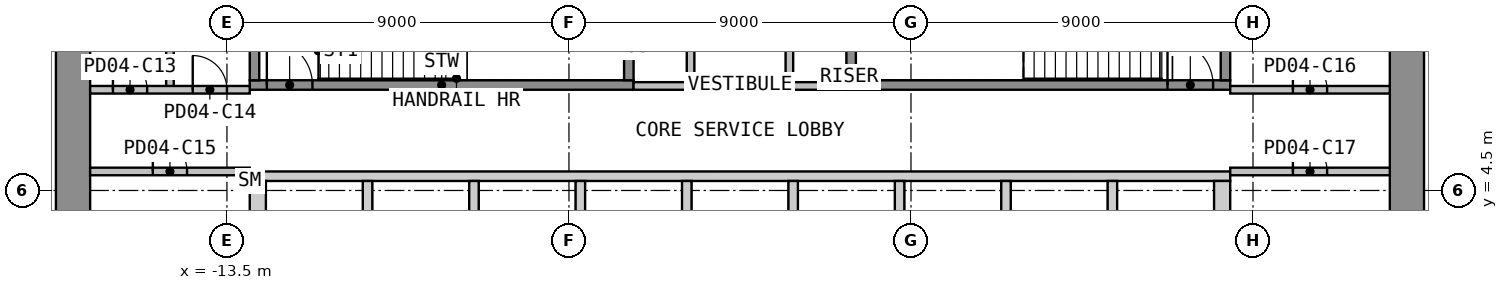
"""IFC4 building model, lengths in metres.
Left out: names, types, materials, properties, quantities, classifications, styles, units other than length and angle.
Written with IfcOpenShell. Run it as: python <this file> out.ifc"""

import sys

from ifc_helpers import new_model, si_unit, direction, frame, frame_2d, origin, place, context, subcontext, project, spatial, polyline, rectangle, outline, extrude, element, fill, save


model = new_model("IFC4")
c1 = context("Model", 3, precision=1e-05, world=origin(), true_north=direction((0.0, 1.0)))
c2 = subcontext(c1, "Body", "Model", "MODEL_VIEW")
j1 = project(units=[si_unit("LENGTHUNIT", "METRE"), si_unit("PLANEANGLEUNIT", "RADIAN")], contexts=[c1])
p1 = place(None, origin())
s1 = spatial("IfcSite", under=j1, at=p1, CompositionType="ELEMENT")
p2 = place(p1, origin())
s2 = spatial("IfcBuilding", under=s1, at=p2, CompositionType="ELEMENT")
p3 = place(p2, frame((0.0, 0.0, 20.4)))
s3 = spatial("IfcBuildingStorey", under=s2, at=p3, CompositionType="ELEMENT", Elevation=20.4)
p4 = place(p3, frame((-17.55, -12.6, 0.0), z_axis=(0.0, 0.0, 1.0), x_axis=(0.0, 1.0, 0.0)))
e1 = element("IfcWall", 1, at=p4, inside=s3, PredefinedType="SHEAR", context=c2, shape_type="SweptSolid", body=[
    extrude(rectangle(XDim=25.2, YDim=0.9, at=frame_2d((12.6, 0.0))), origin(), (0.0, 0.0, 1.0), 4.4),
])
p5 = place(p4, frame((11.4, 0.0, 0.0)))
e2 = element("IfcOpeningElement", 2, at=p5, cuts=e1, PredefinedType="OPENING", context=c2, shape_type="SweptSolid", body=[
    extrude(rectangle(XDim=2.4, YDim=2.1, at=frame_2d((1.2, 1.05))), frame((0.0, 0.46, 0.0), z_axis=(0.0, -1.0, 0.0), x_axis=(1.0, 0.0, 0.0)), (0.0, 0.0, 1.0), 0.92),
])
p6 = place(p3, frame((17.55, -12.6, 0.0), z_axis=(0.0, 0.0, 1.0), x_axis=(0.0, 1.0, 0.0)))
e3 = element("IfcWall", 3, at=p6, inside=s3, PredefinedType="SHEAR", context=c2, shape_type="SweptSolid", body=[
    extrude(rectangle(XDim=25.2, YDim=0.9, at=frame_2d((12.6, 0.0))), origin(), (0.0, 0.0, 1.0), 4.4),
])
p7 = place(p6, frame((11.4, 0.0, 0.0)))
e4 = element("IfcOpeningElement", 4, at=p7, cuts=e3, PredefinedType="OPENING", context=c2, shape_type="SweptSolid", body=[
    extrude(rectangle(XDim=2.4, YDim=2.1, at=frame_2d((1.2, 1.05))), frame((0.0, 0.46, 0.0), z_axis=(0.0, -1.0, 0.0), x_axis=(1.0, 0.0, 0.0)), (0.0, 0.0, 1.0), 0.92),
])
p8 = place(p3, origin())
e5 = element("IfcWall", 5, at=p8, inside=s3, PredefinedType="SHEAR", context=c2, shape_type="SweptSolid", body=[
    extrude(outline(polyline([(-12.9, 4.75), (12.9, 4.75), (12.9, 5.0), (-12.9, 5.0), (-12.9, 4.75)])), origin(), (0.0, 0.0, 1.0), 4.4),
])
p9 = place(p3, origin())
e6 = element("IfcWall", 6, at=p9, inside=s3, PredefinedType="SHEAR", context=c2, shape_type="SweptSolid", body=[
    extrude(outline(polyline([(-12.9, 2.05), (-12.475, 2.05), (-12.475, 4.75), (-12.9, 4.75), (-12.9, 2.05)])), origin(), (0.0, 0.0, 1.0), 4.4),
])
p10 = place(p3, origin())
e7 = element("IfcWall", 7, at=p10, inside=s3, PredefinedType="SHEAR", context=c2, shape_type="SweptSolid", body=[
    extrude(outline(polyline([(-9.925, 2.05), (-9.675, 2.05), (-9.675, 4.75), (-9.925, 4.75), (-9.925, 2.05)])), origin(), (0.0, 0.0, 1.0), 4.4),
])
p11 = place(p3, origin())
e8 = element("IfcWall", 8, at=p11, inside=s3, PredefinedType="SHEAR", context=c2, shape_type="SweptSolid", body=[
    extrude(outline(polyline([(-7.125, 2.05), (-6.875, 2.05), (-6.875, 4.75), (-7.125, 4.75), (-7.125, 2.05)])), origin(), (0.0, 0.0, 1.0), 4.4),
])
p12 = place(p3, origin())
e9 = element("IfcWall", 9, at=p12, inside=s3, PredefinedType="SHEAR", context=c2, shape_type="SweptSolid", body=[
    extrude(outline(polyline([(-4.325, 2.05), (-4.075, 2.05), (-4.075, 4.75), (-4.325, 4.75), (-4.325, 2.05)])), origin(), (0.0, 0.0, 1.0), 4.4),
])
p13 = place(p3, origin())
e10 = element("IfcWall", 10, at=p13, inside=s3, PredefinedType="SHEAR", context=c2, shape_type="SweptSolid", body=[
    extrude(outline(polyline([(-1.525, 2.05), (-1.275, 2.05), (-1.275, 4.75), (-1.525, 4.75), (-1.525, 2.05)])), origin(), (0.0, 0.0, 1.0), 4.4),
])
p14 = place(p3, origin())
e11 = element("IfcWall", 11, at=p14, inside=s3, PredefinedType="SHEAR", context=c2, shape_type="SweptSolid", body=[
    extrude(outline(polyline([(1.275, 2.05), (1.525, 2.05), (1.525, 4.75), (1.275, 4.75), (1.275, 2.05)])), origin(), (0.0, 0.0, 1.0), 4.4),
])
p15 = place(p3, origin())
e12 = element("IfcWall", 12, at=p15, inside=s3, PredefinedType="SHEAR", context=c2, shape_type="SweptSolid", body=[
    extrude(outline(polyline([(4.075, 2.05), (4.325, 2.05), (4.325, 4.75), (4.075, 4.75), (4.075, 2.05)])), origin(), (0.0, 0.0, 1.0), 4.4),
])
p16 = place(p3, origin())
e13 = element("IfcWall", 13, at=p16, inside=s3, PredefinedType="SHEAR", context=c2, shape_type="SweptSolid", body=[
    extrude(outline(polyline([(6.875, 2.05), (7.125, 2.05), (7.125, 4.75), (6.875, 4.75), (6.875, 2.05)])), origin(), (0.0, 0.0, 1.0), 4.4),
])
p17 = place(p3, origin())
e14 = element("IfcWall", 14, at=p17, inside=s3, PredefinedType="SHEAR", context=c2, shape_type="SweptSolid", body=[
    extrude(outline(polyline([(9.675, 2.05), (9.925, 2.05), (9.925, 4.75), (9.675, 4.75), (9.675, 2.05)])), origin(), (0.0, 0.0, 1.0), 4.4),
])
p18 = place(p3, origin())
e15 = element("IfcWall", 15, at=p18, inside=s3, PredefinedType="SHEAR", context=c2, shape_type="SweptSolid", body=[
    extrude(outline(polyline([(12.475, 2.05), (12.9, 2.05), (12.9, 4.75), (12.475, 4.75), (12.475, 2.05)])), origin(), (0.0, 0.0, 1.0), 4.4),
])
p19 = place(p3, frame((-12.9, 7.275, 0.0), z_axis=(0.0, 0.0, 1.0), x_axis=(1.0, 0.0, 0.0)))
e16 = element("IfcWall", 16, at=p19, inside=s3, PredefinedType="SHEAR", context=c2, shape_type="SweptSolid", body=[
    extrude(rectangle(XDim=10.1, YDim=0.25, at=frame_2d((5.05, 0.0))), origin(), (0.0, 0.0, 1.0), 4.4),
])
p20 = place(p19, frame((0.45, 0.0, 0.0)))
e17 = element("IfcOpeningElement", 17, at=p20, cuts=e16, PredefinedType="OPENING", context=c2, shape_type="SweptSolid", body=[
    extrude(rectangle(XDim=1.2, YDim=2.1, at=frame_2d((0.6, 1.05))), frame((0.0, 0.135, 0.0), z_axis=(0.0, -1.0, 0.0), x_axis=(1.0, 0.0, 0.0)), (0.0, 0.0, 1.0), 0.27),
])
for number, where, z_axis, x_axis in (
    (18, (-12.775, 7.4, 0.0), (0.0, 0.0, 1.0), (0.0, 1.0, 0.0)),
    (19, (-2.925, 7.4, 0.0), (0.0, 0.0, 1.0), (0.0, 1.0, 0.0)),
):
    element("IfcWall", number, at=place(p3, frame(where, z_axis=z_axis, x_axis=x_axis)), inside=s3, PredefinedType="SHEAR", context=c2, shape_type="SweptSolid", body=[
        extrude(rectangle(XDim=3.25, YDim=0.25, at=frame_2d((1.625, 0.0))), origin(), (0.0, 0.0, 1.0), 4.4),
    ])
p21 = place(p3, frame((2.8, 7.275, 0.0), z_axis=(0.0, 0.0, 1.0), x_axis=(1.0, 0.0, 0.0)))
e20 = element("IfcWall", 20, at=p21, inside=s3, PredefinedType="SHEAR", context=c2, shape_type="SweptSolid", body=[
    extrude(rectangle(XDim=10.1, YDim=0.25, at=frame_2d((5.05, 0.0))), origin(), (0.0, 0.0, 1.0), 4.4),
])
p22 = place(p21, frame((8.45, 0.0, 0.0)))
e21 = element("IfcOpeningElement", 21, at=p22, cuts=e20, PredefinedType="OPENING", context=c2, shape_type="SweptSolid", body=[
    extrude(rectangle(XDim=1.2, YDim=2.1, at=frame_2d((0.6, 1.05))), frame((0.0, 0.135, 0.0), z_axis=(0.0, -1.0, 0.0), x_axis=(1.0, 0.0, 0.0)), (0.0, 0.0, 1.0), 0.27),
])
for number, where, z_axis, x_axis in (
    (22, (2.925, 7.4, 0.0), (0.0, 0.0, 1.0), (0.0, 1.0, 0.0)),
    (23, (12.775, 7.4, 0.0), (0.0, 0.0, 1.0), (0.0, 1.0, 0.0)),
):
    element("IfcWall", number, at=place(p3, frame(where, z_axis=z_axis, x_axis=x_axis)), inside=s3, PredefinedType="SHEAR", context=c2, shape_type="SweptSolid", body=[
        extrude(rectangle(XDim=3.25, YDim=0.25, at=frame_2d((1.625, 0.0))), origin(), (0.0, 0.0, 1.0), 4.4),
    ])
for number, where, z_axis, x_axis in (
    (24, (-2.8, 7.25, 0.0), (0.0, 0.0, 1.0), (1.0, 0.0, 0.0)),
    (25, (1.4, 7.25, 0.0), (0.0, 0.0, 1.0), (1.0, 0.0, 0.0)),
):
    element("IfcWall", number, at=place(p3, frame(where, z_axis=z_axis, x_axis=x_axis)), inside=s3, PredefinedType="PARTITIONING", context=c2, shape_type="SweptSolid", body=[
        extrude(rectangle(XDim=1.4, YDim=0.2, at=frame_2d((0.7, 0.0))), origin(), (0.0, 0.0, 1.0), 4.4),
    ])
p23 = place(p3, frame((-1.3, 7.15, 0.0), z_axis=(0.0, 0.0, 1.0), x_axis=(0.0, 1.0, 0.0)))
e26 = element("IfcWall", 26, at=p23, inside=s3, PredefinedType="PARTITIONING", context=c2, shape_type="SweptSolid", body=[
    extrude(rectangle(XDim=5.45, YDim=0.2, at=frame_2d((2.725, 0.0))), origin(), (0.0, 0.0, 1.0), 4.4),
])
p24 = place(p23, frame((1.062, 0.0, 0.0)))
e27 = element("IfcOpeningElement", 27, at=p24, cuts=e26, PredefinedType="OPENING", context=c2, shape_type="SweptSolid", body=[
    extrude(rectangle(XDim=0.9, YDim=2.1, at=frame_2d((0.45, 1.05))), frame((0.0, 0.11, 0.0), z_axis=(0.0, -1.0, 0.0), x_axis=(1.0, 0.0, 0.0)), (0.0, 0.0, 1.0), 0.22),
])
p25 = place(p23, frame((3.688, 0.0, 0.0)))
e28 = element("IfcOpeningElement", 28, at=p25, cuts=e26, PredefinedType="OPENING", context=c2, shape_type="SweptSolid", body=[
    extrude(rectangle(XDim=0.9, YDim=2.1, at=frame_2d((0.45, 1.05))), frame((0.0, 0.11, 0.0), z_axis=(0.0, -1.0, 0.0), x_axis=(1.0, 0.0, 0.0)), (0.0, 0.0, 1.0), 0.22),
])
p26 = place(p3, frame((1.3, 7.15, 0.0), z_axis=(0.0, 0.0, 1.0), x_axis=(0.0, 1.0, 0.0)))
e29 = element("IfcWall", 29, at=p26, inside=s3, PredefinedType="PARTITIONING", context=c2, shape_type="SweptSolid", body=[
    extrude(rectangle(XDim=5.45, YDim=0.2, at=frame_2d((2.725, 0.0))), origin(), (0.0, 0.0, 1.0), 4.4),
])
p27 = place(p26, frame((1.062, 0.0, 0.0)))
e30 = element("IfcOpeningElement", 30, at=p27, cuts=e29, PredefinedType="OPENING", context=c2, shape_type="SweptSolid", body=[
    extrude(rectangle(XDim=0.9, YDim=2.1, at=frame_2d((0.45, 1.05))), frame((0.0, 0.11, 0.0), z_axis=(0.0, -1.0, 0.0), x_axis=(1.0, 0.0, 0.0)), (0.0, 0.0, 1.0), 0.22),
])
p28 = place(p26, frame((3.688, 0.0, 0.0)))
e31 = element("IfcOpeningElement", 31, at=p28, cuts=e29, PredefinedType="OPENING", context=c2, shape_type="SweptSolid", body=[
    extrude(rectangle(XDim=0.9, YDim=2.1, at=frame_2d((0.45, 1.05))), frame((0.0, 0.11, 0.0), z_axis=(0.0, -1.0, 0.0), x_axis=(1.0, 0.0, 0.0)), (0.0, 0.0, 1.0), 0.22),
])
p29 = place(p3, frame((-15.0, 7.15, 0.0), z_axis=(0.0, 0.0, 1.0), x_axis=(0.0, 1.0, 0.0)))
e32 = element("IfcWall", 32, at=p29, inside=s3, PredefinedType="PARTITIONING", context=c2, shape_type="SweptSolid", body=[
    extrude(rectangle(XDim=5.45, YDim=0.2, at=frame_2d((2.725, 0.0))), origin(), (0.0, 0.0, 1.0), 4.4),
])
p30 = place(p3, frame((-17.1, 7.15, 0.0), z_axis=(0.0, 0.0, 1.0), x_axis=(1.0, 0.0, 0.0)))
e33 = element("IfcWall", 33, at=p30, inside=s3, PredefinedType="PARTITIONING", context=c2, shape_type="SweptSolid", body=[
    extrude(rectangle(XDim=4.2, YDim=0.2, at=frame_2d((2.1, 0.0))), origin(), (0.0, 0.0, 1.0), 4.4),
])
p31 = place(p30, frame((0.6, 0.0, 0.0)))
e34 = element("IfcOpeningElement", 34, at=p31, cuts=e33, PredefinedType="OPENING", context=c2, shape_type="SweptSolid", body=[
    extrude(rectangle(XDim=0.9, YDim=2.1, at=frame_2d((0.45, 1.05))), frame((0.0, 0.11, 0.0), z_axis=(0.0, -1.0, 0.0), x_axis=(1.0, 0.0, 0.0)), (0.0, 0.0, 1.0), 0.22),
])
p32 = place(p30, frame((2.7, 0.0, 0.0)))
e35 = element("IfcOpeningElement", 35, at=p32, cuts=e33, PredefinedType="OPENING", context=c2, shape_type="SweptSolid", body=[
    extrude(rectangle(XDim=0.9, YDim=2.1, at=frame_2d((0.45, 1.05))), frame((0.0, 0.11, 0.0), z_axis=(0.0, -1.0, 0.0), x_axis=(1.0, 0.0, 0.0)), (0.0, 0.0, 1.0), 0.22),
])
p33 = place(p3, frame((-17.1, 5.0, 0.0), z_axis=(0.0, 0.0, 1.0), x_axis=(1.0, 0.0, 0.0)))
e36 = element("IfcWall", 36, at=p33, inside=s3, PredefinedType="PARTITIONING", context=c2, shape_type="SweptSolid", body=[
    extrude(rectangle(XDim=4.2, YDim=0.2, at=frame_2d((2.1, 0.0))), origin(), (0.0, 0.0, 1.0), 4.4),
])
p34 = place(p33, frame((1.65, 0.0, 0.0)))
e37 = element("IfcOpeningElement", 37, at=p34, cuts=e36, PredefinedType="OPENING", context=c2, shape_type="SweptSolid", body=[
    extrude(rectangle(XDim=0.9, YDim=2.1, at=frame_2d((0.45, 1.05))), frame((0.0, 0.11, 0.0), z_axis=(0.0, -1.0, 0.0), x_axis=(1.0, 0.0, 0.0)), (0.0, 0.0, 1.0), 0.22),
])
p35 = place(p3, frame((12.9, 7.15, 0.0), z_axis=(0.0, 0.0, 1.0), x_axis=(1.0, 0.0, 0.0)))
e38 = element("IfcWall", 38, at=p35, inside=s3, PredefinedType="PARTITIONING", context=c2, shape_type="SweptSolid", body=[
    extrude(rectangle(XDim=4.2, YDim=0.2, at=frame_2d((2.1, 0.0))), origin(), (0.0, 0.0, 1.0), 4.4),
])
p36 = place(p35, frame((1.65, 0.0, 0.0)))
e39 = element("IfcOpeningElement", 39, at=p36, cuts=e38, PredefinedType="OPENING", context=c2, shape_type="SweptSolid", body=[
    extrude(rectangle(XDim=0.9, YDim=2.1, at=frame_2d((0.45, 1.05))), frame((0.0, 0.11, 0.0), z_axis=(0.0, -1.0, 0.0), x_axis=(1.0, 0.0, 0.0)), (0.0, 0.0, 1.0), 0.22),
])
p37 = place(p3, frame((12.9, 5.0, 0.0), z_axis=(0.0, 0.0, 1.0), x_axis=(1.0, 0.0, 0.0)))
e40 = element("IfcWall", 40, at=p37, inside=s3, PredefinedType="PARTITIONING", context=c2, shape_type="SweptSolid", body=[
    extrude(rectangle(XDim=4.2, YDim=0.2, at=frame_2d((2.1, 0.0))), origin(), (0.0, 0.0, 1.0), 4.4),
])
p38 = place(p37, frame((1.65, 0.0, 0.0)))
e41 = element("IfcOpeningElement", 41, at=p38, cuts=e40, PredefinedType="OPENING", context=c2, shape_type="SweptSolid", body=[
    extrude(rectangle(XDim=0.9, YDim=2.1, at=frame_2d((0.45, 1.05))), frame((0.0, 0.11, 0.0), z_axis=(0.0, -1.0, 0.0), x_axis=(1.0, 0.0, 0.0)), (0.0, 0.0, 1.0), 0.22),
])
p39 = place(p20, origin())
e42 = element("IfcDoor", 42, at=p39, inside=s3, OperationType="SINGLE_SWING_LEFT", PredefinedType="DOOR", context=c2, shape_type="SweptSolid", body=[
    extrude(rectangle(XDim=1.2, YDim=2.1, at=frame_2d((0.6, 1.05))), frame((0.0, 0.025, 0.0), z_axis=(0.0, -1.0, 0.0), x_axis=(1.0, 0.0, 0.0)), (0.0, 0.0, 1.0), 0.05),
])
fill(e17, e42)
p40 = place(p22, origin())
e43 = element("IfcDoor", 43, at=p40, inside=s3, OperationType="SINGLE_SWING_LEFT", PredefinedType="DOOR", context=c2, shape_type="SweptSolid", body=[
    extrude(rectangle(XDim=1.2, YDim=2.1, at=frame_2d((0.6, 1.05))), frame((0.0, 0.025, 0.0), z_axis=(0.0, -1.0, 0.0), x_axis=(1.0, 0.0, 0.0)), (0.0, 0.0, 1.0), 0.05),
])
fill(e21, e43)
p41 = place(p31, origin())
e44 = element("IfcDoor", 44, at=p41, inside=s3, OperationType="SINGLE_SWING_LEFT", PredefinedType="DOOR", context=c2, shape_type="SweptSolid", body=[
    extrude(rectangle(XDim=0.9, YDim=2.1, at=frame_2d((0.45, 1.05))), frame((0.0, 0.025, 0.0), z_axis=(0.0, -1.0, 0.0), x_axis=(1.0, 0.0, 0.0)), (0.0, 0.0, 1.0), 0.05),
])
fill(e34, e44)
p42 = place(p32, origin())
e45 = element("IfcDoor", 45, at=p42, inside=s3, OperationType="SINGLE_SWING_LEFT", PredefinedType="DOOR", context=c2, shape_type="SweptSolid", body=[
    extrude(rectangle(XDim=0.9, YDim=2.1, at=frame_2d((0.45, 1.05))), frame((0.0, 0.025, 0.0), z_axis=(0.0, -1.0, 0.0), x_axis=(1.0, 0.0, 0.0)), (0.0, 0.0, 1.0), 0.05),
])
fill(e35, e45)
p43 = place(p34, origin())
e46 = element("IfcDoor", 46, at=p43, inside=s3, OperationType="SINGLE_SWING_LEFT", PredefinedType="DOOR", context=c2, shape_type="SweptSolid", body=[
    extrude(rectangle(XDim=0.9, YDim=2.1, at=frame_2d((0.45, 1.05))), frame((0.0, 0.025, 0.0), z_axis=(0.0, -1.0, 0.0), x_axis=(1.0, 0.0, 0.0)), (0.0, 0.0, 1.0), 0.05),
])
fill(e37, e46)
p44 = place(p36, origin())
e47 = element("IfcDoor", 47, at=p44, inside=s3, OperationType="SINGLE_SWING_LEFT", PredefinedType="DOOR", context=c2, shape_type="SweptSolid", body=[
    extrude(rectangle(XDim=0.9, YDim=2.1, at=frame_2d((0.45, 1.05))), frame((0.0, 0.025, 0.0), z_axis=(0.0, -1.0, 0.0), x_axis=(1.0, 0.0, 0.0)), (0.0, 0.0, 1.0), 0.05),
])
fill(e39, e47)
p45 = place(p38, origin())
e48 = element("IfcDoor", 48, at=p45, inside=s3, OperationType="SINGLE_SWING_LEFT", PredefinedType="DOOR", context=c2, shape_type="SweptSolid", body=[
    extrude(rectangle(XDim=0.9, YDim=2.1, at=frame_2d((0.45, 1.05))), frame((0.0, 0.025, 0.0), z_axis=(0.0, -1.0, 0.0), x_axis=(1.0, 0.0, 0.0)), (0.0, 0.0, 1.0), 0.05),
])
fill(e41, e48)
save(model, sys.argv[1])
